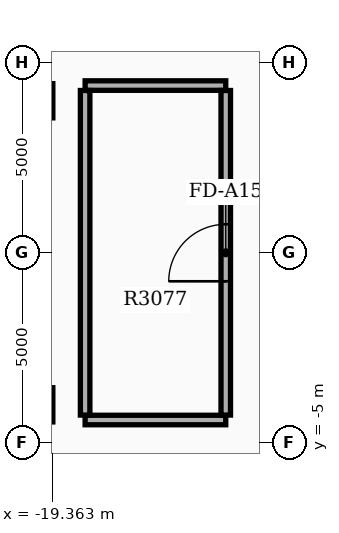
"""IFC4 building model, lengths in metres.
Left out: names, types, materials, properties, quantities, classifications, styles, units other than length and angle.
Written with IfcOpenShell. Run it as: python <this file> out.ifc"""

import sys

from ifc_helpers import new_model, si_unit, direction, frame, frame_2d, origin, origin_2d, place, context, subcontext, project, spatial, rectangle, extrude, element, fill, save


model = new_model("IFC4")
c1 = context("Model", 3, precision=1e-05, world=origin(), true_north=direction((0.0, 1.0)))
c2 = subcontext(c1, "Body", "Model", "MODEL_VIEW")
j1 = project(units=[si_unit("LENGTHUNIT", "METRE"), si_unit("PLANEANGLEUNIT", "RADIAN")], contexts=[c1])
p1 = place(None, origin())
s1 = spatial("IfcSite", under=j1, at=p1, CompositionType="ELEMENT")
p2 = place(p1, origin())
s2 = spatial("IfcBuilding", under=s1, at=p2, CompositionType="ELEMENT")
p3 = place(p2, frame((0.0, 0.0, 191.7)))
s3 = spatial("IfcBuildingStorey", under=s2, at=p3, CompositionType="ELEMENT", Elevation=191.7)
for number, where, z_axis, x_axis in (
    (1, (-19.8, -4.0, 0.0), (0.0, 0.0, 1.0), (1.0, 0.0, 0.0)),
    (2, (-19.8, 4.0, 0.0), (0.0, 0.0, 1.0), (1.0, 0.0, 0.0)),
):
    element("IfcColumn", number, at=place(p3, frame(where, z_axis=z_axis, x_axis=x_axis)), inside=s3, PredefinedType="COLUMN", context=c2, shape_type="SweptSolid", body=[
        extrude(rectangle(XDim=0.9, YDim=0.9, at=origin_2d()), origin(), (0.0, 0.0, 1.0), 5.1),
    ])
for number, where, z_axis, x_axis in (
    (3, (-18.5, -4.4, 0.0), (0.0, 0.0, 1.0), (1.0, 0.0, 0.0)),
    (4, (-18.5, 4.4, 0.0), (0.0, 0.0, 1.0), (1.0, 0.0, 0.0)),
):
    element("IfcWall", number, at=place(p3, frame(where, z_axis=z_axis, x_axis=x_axis)), inside=s3, PredefinedType="SOLIDWALL", context=c2, shape_type="SweptSolid", body=[
        extrude(rectangle(XDim=3.7, YDim=0.25, at=frame_2d((1.85, 0.0))), origin(), (0.0, 0.0, 1.0), 3.92),
    ])
p4 = place(p3, frame((-18.5, -4.27, 0.0), z_axis=(0.0, 0.0, 1.0), x_axis=(0.0, 1.0, 0.0)))
e5 = element("IfcWall", 5, at=p4, inside=s3, PredefinedType="SOLIDWALL", context=c2, shape_type="SweptSolid", body=[
    extrude(rectangle(XDim=8.54, YDim=0.25, at=frame_2d((4.27, 0.0))), origin(), (0.0, 0.0, 1.0), 3.92),
])
p5 = place(p3, frame((-14.8, -4.27, 0.0), z_axis=(0.0, 0.0, 1.0), x_axis=(0.0, 1.0, 0.0)))
e6 = element("IfcWall", 6, at=p5, inside=s3, PredefinedType="SOLIDWALL", context=c2, shape_type="SweptSolid", body=[
    extrude(rectangle(XDim=8.54, YDim=0.25, at=frame_2d((4.27, 0.0))), origin(), (0.0, 0.0, 1.0), 3.92),
])
p6 = place(p5, frame((3.52, 0.0, 0.0)))
e7 = element("IfcOpeningElement", 7, at=p6, cuts=e6, PredefinedType="OPENING", context=c2, shape_type="SweptSolid", body=[
    extrude(rectangle(XDim=1.5, YDim=2.15, at=frame_2d((0.75, 1.075))), frame((0.0, 0.135, 0.0), z_axis=(0.0, -1.0, 0.0), x_axis=(1.0, 0.0, 0.0)), (0.0, 0.0, 1.0), 0.27),
])
p7 = place(p6, origin())
e8 = element("IfcDoor", 8, at=p7, inside=s3, OperationType="DOUBLE_DOOR_SINGLE_SWING", PredefinedType="DOOR", context=c2, shape_type="SweptSolid", body=[
    extrude(rectangle(XDim=1.5, YDim=2.15, at=frame_2d((0.75, 1.075))), frame((0.0, 0.025, 0.0), z_axis=(0.0, -1.0, 0.0), x_axis=(1.0, 0.0, 0.0)), (0.0, 0.0, 1.0), 0.05),
])
fill(e7, e8)
save(model, sys.argv[1])
